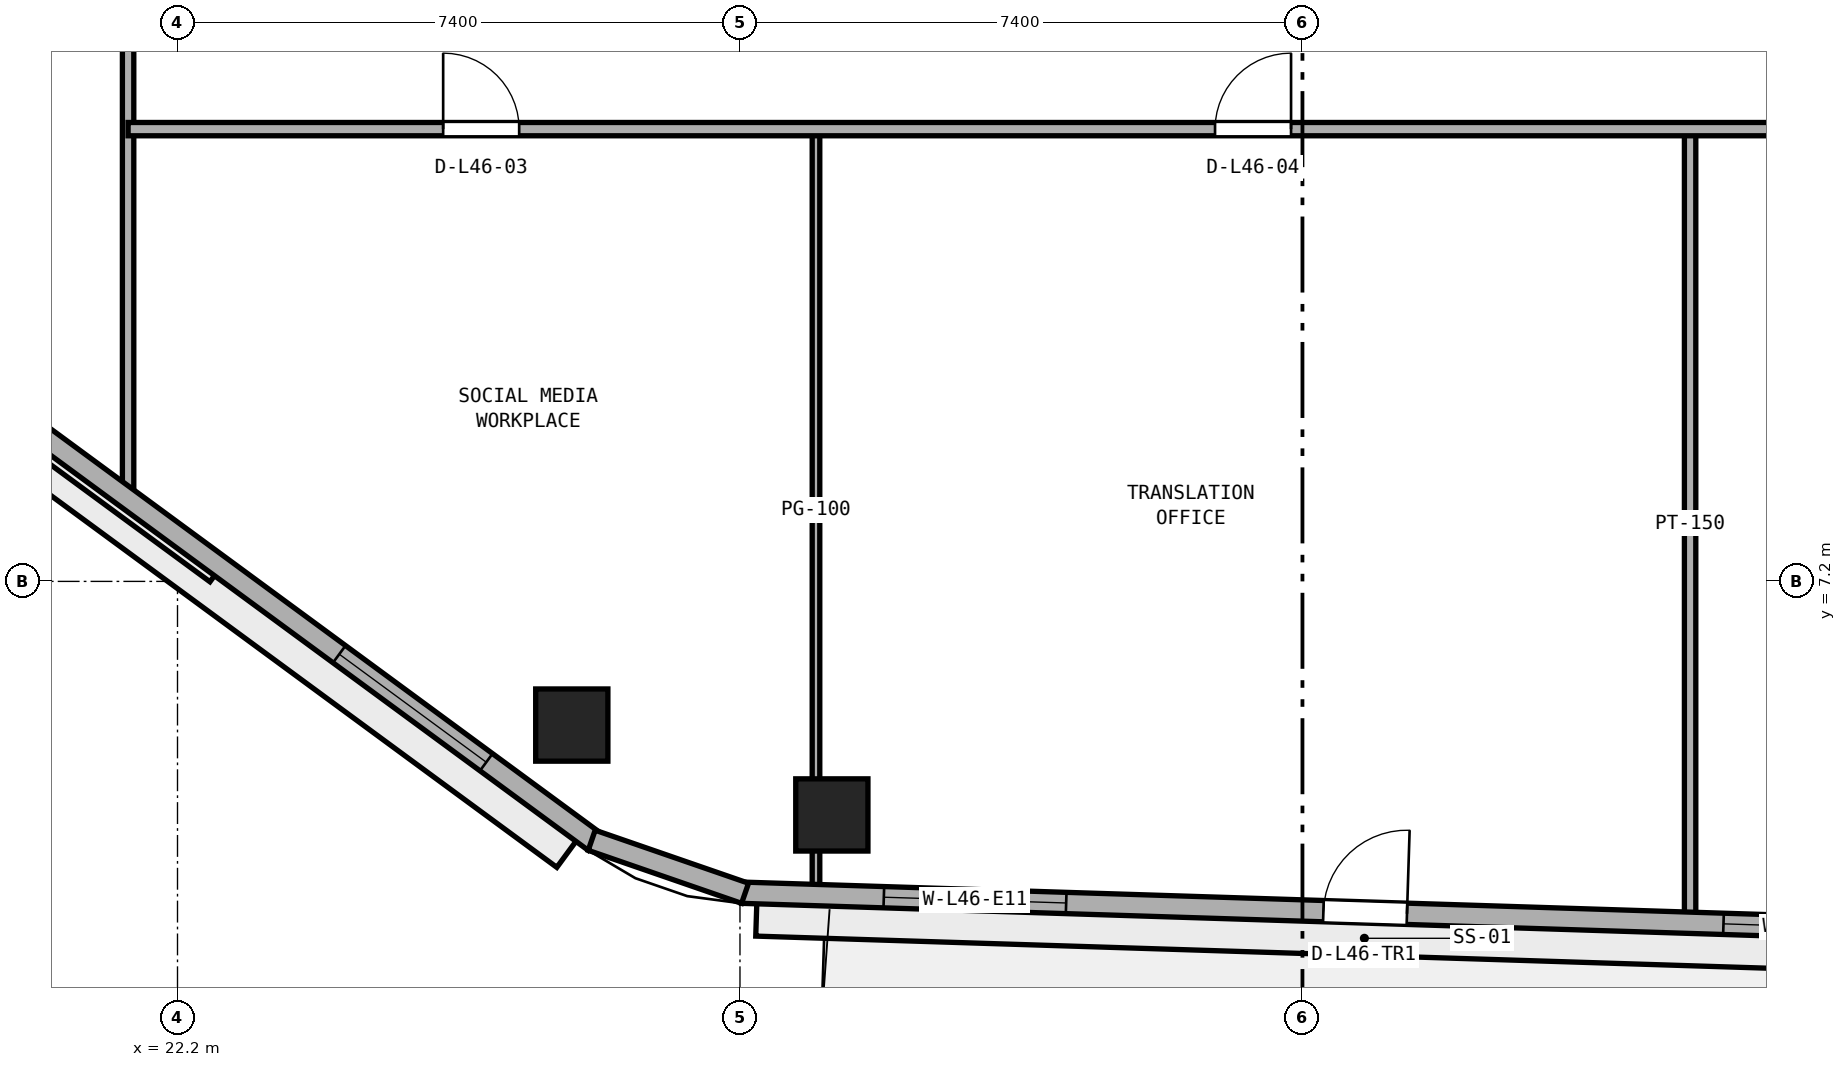
"""IFC4 building model, lengths in metres.
Left out: names, types, materials, properties, quantities, classifications, styles, units other than length and angle.
Written with IfcOpenShell. Run it as: python <this file> out.ifc"""

import sys

from ifc_helpers import new_model, si_unit, direction, frame, frame_2d, origin, origin_2d, place, context, subcontext, project, spatial, rectangle, extrude, element, fill, save


model = new_model("IFC4")
c1 = context("Model", 3, precision=1e-05, world=origin(), true_north=direction((0.0, 1.0)))
c2 = subcontext(c1, "Body", "Model", "MODEL_VIEW")
j1 = project(units=[si_unit("LENGTHUNIT", "METRE"), si_unit("PLANEANGLEUNIT", "RADIAN")], contexts=[c1])
p1 = place(None, origin())
s1 = spatial("IfcSite", under=j1, at=p1, CompositionType="ELEMENT")
p2 = place(p1, origin())
s2 = spatial("IfcBuilding", under=s1, at=p2, CompositionType="ELEMENT")
p3 = place(p2, frame((0.0, 0.0, 182.0)))
s3 = spatial("IfcBuildingStorey", under=s2, at=p3, CompositionType="ELEMENT", Elevation=182.0)
for number, where, z_axis, x_axis in (
    (1, (30.809, 4.127, 0.0), (0.0, 0.0, 1.0), (1.0, 0.0, 0.0)),
    (2, (27.387, 5.31, 0.0), (0.0, 0.0, 1.0), (1.0, 0.0, 0.0)),
):
    element("IfcColumn", number, at=place(p3, frame(where, z_axis=z_axis, x_axis=x_axis)), inside=s3, PredefinedType="COLUMN", context=c2, shape_type="SweptSolid", body=[
        extrude(rectangle(XDim=0.95, YDim=0.95, at=origin_2d()), origin(), (0.0, 0.0, 1.0), 3.8),
    ])
p4 = place(p3, frame((42.1, 2.774, 0.0), z_axis=(0.0, 0.0, 1.0), x_axis=(0.0, 1.0, 0.0)))
e3 = element("IfcWall", 3, at=p4, inside=s3, PredefinedType="PARTITIONING", context=c2, shape_type="SweptSolid", body=[
    extrude(rectangle(XDim=10.376, YDim=0.15, at=frame_2d((5.188, 0.0))), origin(), (0.0, 0.0, 1.0), 3.54),
])
p5 = place(p3, frame((30.6, 3.138, 0.0), z_axis=(0.0, 0.0, 1.0), x_axis=(0.0, 1.0, 0.0)))
e4 = element("IfcWall", 4, at=p5, inside=s3, PredefinedType="PARTITIONING", context=c2, shape_type="SweptSolid", body=[
    extrude(rectangle(XDim=10.011, YDim=0.1, at=frame_2d((5.006, 0.0))), origin(), (0.0, 0.0, 1.0), 2.923),
])
p6 = place(p3, frame((21.55, 8.25, 0.0), z_axis=(0.0, 0.0, 1.0), x_axis=(0.0, 1.0, 0.0)))
e5 = element("IfcWall", 5, at=p6, inside=s3, PredefinedType="PARTITIONING", context=c2, shape_type="SweptSolid", body=[
    extrude(rectangle(XDim=15.6, YDim=0.15, at=frame_2d((7.8, 0.0))), origin(), (0.0, 0.0, 1.0), 3.54),
])
p7 = place(p6, frame((7.574, 0.0, 0.0)))
e6 = element("IfcOpeningElement", 6, at=p7, cuts=e5, PredefinedType="OPENING", context=c2, shape_type="SweptSolid", body=[
    extrude(rectangle(XDim=1.0, YDim=2.12, at=frame_2d((0.5, 1.06))), frame((0.0, 0.085, 0.0), z_axis=(0.0, -1.0, 0.0), x_axis=(1.0, 0.0, 0.0)), (0.0, 0.0, 1.0), 0.17),
])
p8 = place(p3, frame((21.55, 13.15, 0.0), z_axis=(0.0, 0.0, 1.0), x_axis=(1.0, 0.0, 0.0)))
e7 = element("IfcWall", 7, at=p8, inside=s3, PredefinedType="PARTITIONING", context=c2, shape_type="SweptSolid", body=[
    extrude(rectangle(XDim=30.9, YDim=0.175, at=frame_2d((15.45, 0.0))), origin(), (0.0, 0.0, 1.0), 3.54),
])
p9 = place(p8, frame((4.145, 0.0, 0.0)))
e8 = element("IfcOpeningElement", 8, at=p9, cuts=e7, PredefinedType="OPENING", context=c2, shape_type="SweptSolid", body=[
    extrude(rectangle(XDim=1.0, YDim=2.12, at=frame_2d((0.5, 1.06))), frame((0.0, 0.097, 0.0), z_axis=(0.0, -1.0, 0.0), x_axis=(1.0, 0.0, 0.0)), (0.0, 0.0, 1.0), 0.195),
])
p10 = place(p8, frame((14.3, 0.0, 0.0)))
e9 = element("IfcOpeningElement", 9, at=p10, cuts=e7, PredefinedType="OPENING", context=c2, shape_type="SweptSolid", body=[
    extrude(rectangle(XDim=1.0, YDim=2.12, at=frame_2d((0.5, 1.06))), frame((0.0, 0.097, 0.0), z_axis=(0.0, -1.0, 0.0), x_axis=(1.0, 0.0, 0.0)), (0.0, 0.0, 1.0), 0.195),
])
p11 = place(p8, frame((25.105, 0.0, 0.0)))
e10 = element("IfcOpeningElement", 10, at=p11, cuts=e7, PredefinedType="OPENING", context=c2, shape_type="SweptSolid", body=[
    extrude(rectangle(XDim=1.0, YDim=2.12, at=frame_2d((0.5, 1.06))), frame((0.0, 0.097, 0.0), z_axis=(0.0, -1.0, 0.0), x_axis=(1.0, 0.0, 0.0)), (0.0, 0.0, 1.0), 0.195),
])
p12 = place(p3, frame((29.625, 3.104, 0.0), z_axis=(0.0, 0.0, 1.0), x_axis=(0.99949718661, -0.031707632487, 0.0)))
e11 = element("IfcWall", 11, at=p12, inside=s3, PredefinedType="STANDARD", context=c2, shape_type="SweptSolid", body=[
    extrude(rectangle(XDim=16.408, YDim=0.28, at=frame_2d((8.204, 0.0))), origin(), (0.0, 0.0, 1.0), 3.54),
])
p13 = place(p12, frame((7.654, 0.0, 0.0)))
e12 = element("IfcOpeningElement", 12, at=p13, cuts=e11, PredefinedType="OPENING", context=c2, shape_type="SweptSolid", body=[
    extrude(rectangle(XDim=1.1, YDim=2.2, at=frame_2d((0.55, 1.1))), frame((0.0, 0.15, 0.0), z_axis=(0.0, -1.0, 0.0), x_axis=(1.0, 0.0, 0.0)), (0.0, 0.0, 1.0), 0.3),
])
p14 = place(p12, frame((1.868, 0.0, 0.9)))
e13 = element("IfcOpeningElement", 13, at=p14, cuts=e11, PredefinedType="OPENING", context=c2, shape_type="SweptSolid", body=[
    extrude(rectangle(XDim=2.4, YDim=1.75, at=frame_2d((1.2, 0.875))), frame((0.0, 0.15, 0.0), z_axis=(0.0, -1.0, 0.0), x_axis=(1.0, 0.0, 0.0)), (0.0, 0.0, 1.0), 0.3),
])
p15 = place(p12, frame((12.92, 0.0, 0.9)))
e14 = element("IfcOpeningElement", 14, at=p15, cuts=e11, PredefinedType="OPENING", context=c2, shape_type="SweptSolid", body=[
    extrude(rectangle(XDim=2.4, YDim=1.75, at=frame_2d((1.2, 0.875))), frame((0.0, 0.15, 0.0), z_axis=(0.0, -1.0, 0.0), x_axis=(1.0, 0.0, 0.0)), (0.0, 0.0, 1.0), 0.3),
])
p16 = place(p3, frame((14.951, 13.134, 0.0), z_axis=(0.0, 0.0, 1.0), x_axis=(0.805804940328, -0.592181051827, 0.0)))
e15 = element("IfcWall", 15, at=p16, inside=s3, PredefinedType="STANDARD", context=c2, shape_type="SweptSolid", body=[
    extrude(rectangle(XDim=15.804, YDim=0.28, at=frame_2d((7.902, 0.0))), origin(), (0.0, 0.0, 1.0), 3.54),
])
p17 = place(p16, frame((1.767, 0.0, 0.9)))
e16 = element("IfcOpeningElement", 16, at=p17, cuts=e15, PredefinedType="OPENING", context=c2, shape_type="SweptSolid", body=[
    extrude(rectangle(XDim=2.4, YDim=1.75, at=frame_2d((1.2, 0.875))), frame((0.0, 0.15, 0.0), z_axis=(0.0, -1.0, 0.0), x_axis=(1.0, 0.0, 0.0)), (0.0, 0.0, 1.0), 0.3),
])
p18 = place(p16, frame((11.637, 0.0, 0.9)))
e17 = element("IfcOpeningElement", 17, at=p18, cuts=e15, PredefinedType="OPENING", context=c2, shape_type="SweptSolid", body=[
    extrude(rectangle(XDim=2.4, YDim=1.75, at=frame_2d((1.2, 0.875))), frame((0.0, 0.15, 0.0), z_axis=(0.0, -1.0, 0.0), x_axis=(1.0, 0.0, 0.0)), (0.0, 0.0, 1.0), 0.3),
])
p19 = place(p3, frame((27.649, 3.794, 0.0), z_axis=(0.0, 0.0, 1.0), x_axis=(0.945149124969, -0.326639145802, 0.0)))
e18 = element("IfcWall", 18, at=p19, inside=s3, PredefinedType="STANDARD", context=c2, shape_type="SweptSolid", body=[
    extrude(rectangle(XDim=2.135, YDim=0.28, at=frame_2d((1.067, 0.0))), origin(), (0.0, 0.0, 1.0), 3.54),
])
p20 = place(p9, origin())
e19 = element("IfcDoor", 19, at=p20, inside=s3, OperationType="SINGLE_SWING_LEFT", PredefinedType="DOOR", context=c2, shape_type="SweptSolid", body=[
    extrude(rectangle(XDim=1.0, YDim=2.12, at=frame_2d((0.5, 1.06))), frame((0.0, 0.025, 0.0), z_axis=(0.0, -1.0, 0.0), x_axis=(1.0, 0.0, 0.0)), (0.0, 0.0, 1.0), 0.05),
])
fill(e8, e19)
p21 = place(p10, origin())
e20 = element("IfcDoor", 20, at=p21, inside=s3, OperationType="SINGLE_SWING_RIGHT", PredefinedType="DOOR", context=c2, shape_type="SweptSolid", body=[
    extrude(rectangle(XDim=1.0, YDim=2.12, at=frame_2d((0.5, 1.06))), frame((0.0, 0.025, 0.0), z_axis=(0.0, -1.0, 0.0), x_axis=(1.0, 0.0, 0.0)), (0.0, 0.0, 1.0), 0.05),
])
fill(e9, e20)
p22 = place(p13, origin())
e21 = element("IfcDoor", 21, at=p22, inside=s3, OperationType="SINGLE_SWING_RIGHT", PredefinedType="DOOR", context=c2, shape_type="SweptSolid", body=[
    extrude(rectangle(XDim=1.1, YDim=2.2, at=frame_2d((0.55, 1.1))), frame((0.0, 0.025, 0.0), z_axis=(0.0, -1.0, 0.0), x_axis=(1.0, 0.0, 0.0)), (0.0, 0.0, 1.0), 0.05),
])
fill(e12, e21)
p23 = place(p14, origin())
e22 = element("IfcWindow", 22, at=p23, inside=s3, PartitioningType="SINGLE_PANEL", PredefinedType="WINDOW", context=c2, shape_type="SweptSolid", body=[
    extrude(rectangle(XDim=2.4, YDim=1.75, at=frame_2d((1.2, 0.875))), frame((0.0, 0.03, 0.0), z_axis=(0.0, -1.0, 0.0), x_axis=(1.0, 0.0, 0.0)), (0.0, 0.0, 1.0), 0.06),
])
fill(e13, e22)
p24 = place(p15, origin())
e23 = element("IfcWindow", 23, at=p24, inside=s3, PartitioningType="SINGLE_PANEL", PredefinedType="WINDOW", context=c2, shape_type="SweptSolid", body=[
    extrude(rectangle(XDim=2.4, YDim=1.75, at=frame_2d((1.2, 0.875))), frame((0.0, 0.03, 0.0), z_axis=(0.0, -1.0, 0.0), x_axis=(1.0, 0.0, 0.0)), (0.0, 0.0, 1.0), 0.06),
])
fill(e14, e23)
p25 = place(p18, origin())
e24 = element("IfcWindow", 24, at=p25, inside=s3, PartitioningType="SINGLE_PANEL", PredefinedType="WINDOW", context=c2, shape_type="SweptSolid", body=[
    extrude(rectangle(XDim=2.4, YDim=1.75, at=frame_2d((1.2, 0.875))), frame((0.0, 0.03, 0.0), z_axis=(0.0, -1.0, 0.0), x_axis=(1.0, 0.0, 0.0)), (0.0, 0.0, 1.0), 0.06),
])
fill(e17, e24)
save(model, sys.argv[1])
